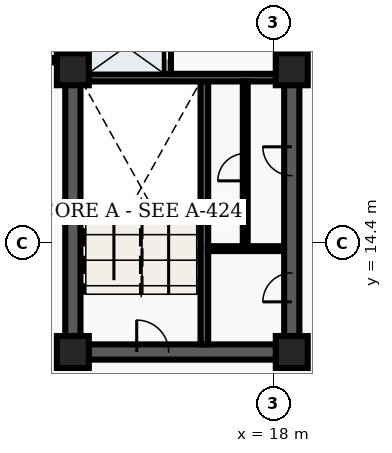
"""IFC4 building model, lengths in metres.
Left out: names, types, materials, properties, quantities, classifications, styles, units other than length and angle.
Written with IfcOpenShell. Run it as: python <this file> out.ifc"""

import sys

from ifc_helpers import new_model, entity, si_unit, converted_unit, direction, frame, origin_with_axes, origin_2d_with_axis, place, context, subcontext, project, spatial, polyline, rectangle, outline, extrude, element, fill, save


model = new_model("IFC4")
c1 = context("Model", 3, precision=1e-05, world=origin_with_axes(), true_north=direction((0.0, 1.0)))
c2 = subcontext(c1, "Body", "Model", "MODEL_VIEW")
j1 = project(units=[si_unit("LENGTHUNIT", "METRE"), converted_unit("PLANEANGLEUNIT", "DEGREE", entity("IfcPlaneAngleMeasure", 0.017), si_unit("PLANEANGLEUNIT", "RADIAN"), dimensions=[0, 0, 0, 0, 0, 0, 0])], contexts=[c1])
p1 = place(None, origin_with_axes())
s1 = spatial("IfcSite", under=j1, at=p1, CompositionType="ELEMENT")
p2 = place(p1, origin_with_axes())
s2 = spatial("IfcBuilding", under=s1, at=p2, CompositionType="ELEMENT")
p3 = place(p2, frame((0.0, 0.0, 183.6), z_axis=(0.0, 0.0, 1.0), x_axis=(1.0, 0.0, 0.0)))
s3 = spatial("IfcBuildingStorey", under=s2, at=p3, CompositionType="ELEMENT", Elevation=183.6)
p4 = place(p3, frame((11.4, 10.8, 0.0), z_axis=(0.0, 0.0, 1.0), x_axis=(0.0, 1.0, 0.0)))
e1 = element("IfcWall", 1, at=p4, inside=s3, PredefinedType="SHEAR", context=c2, shape_type="SweptSolid", body=[
    extrude(outline(polyline([(0.0, -0.25), (27.0, -0.25), (27.0, 0.25), (0.0, 0.25), (0.0, -0.25)])), origin_with_axes(), (0.0, 0.0, 1.0), 3.6),
])
p5 = place(p3, frame((11.4, 10.8, 0.0), z_axis=(0.0, 0.0, 1.0), x_axis=(1.0, 0.0, 0.0)))
e2 = element("IfcWall", 2, at=p5, inside=s3, PredefinedType="SHEAR", context=c2, shape_type="SweptSolid", body=[
    extrude(outline(polyline([(0.0, -0.25), (7.2, -0.25), (7.2, 0.25), (0.0, 0.25), (0.0, -0.25)])), origin_with_axes(), (0.0, 0.0, 1.0), 3.6),
])
p6 = place(p5, frame((2.625, 0.0, 0.0), z_axis=(0.0, 0.0, 1.0), x_axis=(1.0, 0.0, 0.0)))
e3 = element("IfcOpeningElement", 3, at=p6, cuts=e2, PredefinedType="OPENING", context=c2, shape_type="SweptSolid", body=[
    extrude(rectangle(XDim=1.05, YDim=0.52, at=origin_2d_with_axis()), origin_with_axes(), (0.0, 0.0, 1.0), 2.15),
])
p7 = place(p3, frame((18.6, 10.8, 0.0), z_axis=(0.0, 0.0, 1.0), x_axis=(0.0, 1.0, 0.0)))
e4 = element("IfcWall", 4, at=p7, inside=s3, PredefinedType="SHEAR", context=c2, shape_type="SweptSolid", body=[
    extrude(outline(polyline([(0.0, -0.25), (13.5, -0.25), (13.5, 0.25), (0.0, 0.25), (0.0, -0.25)])), origin_with_axes(), (0.0, 0.0, 1.0), 3.6),
])
p8 = place(p7, frame((11.125, 0.0, 0.0), z_axis=(0.0, 0.0, 1.0), x_axis=(1.0, 0.0, 0.0)))
e5 = element("IfcOpeningElement", 5, at=p8, cuts=e4, PredefinedType="OPENING", context=c2, shape_type="SweptSolid", body=[
    extrude(rectangle(XDim=1.05, YDim=0.52, at=origin_2d_with_axis()), origin_with_axes(), (0.0, 0.0, 1.0), 2.15),
])
p9 = place(p7, frame((2.125, 0.0, 0.0), z_axis=(0.0, 0.0, 1.0), x_axis=(1.0, 0.0, 0.0)))
e6 = element("IfcOpeningElement", 6, at=p9, cuts=e4, PredefinedType="OPENING", context=c2, shape_type="SweptSolid", body=[
    extrude(rectangle(XDim=0.95, YDim=0.52, at=origin_2d_with_axis()), origin_with_axes(), (0.0, 0.0, 1.0), 2.15),
])
p10 = place(p7, frame((6.275, 0.0, 0.0), z_axis=(0.0, 0.0, 1.0), x_axis=(1.0, 0.0, 0.0)))
e7 = element("IfcOpeningElement", 7, at=p10, cuts=e4, PredefinedType="OPENING", context=c2, shape_type="SweptSolid", body=[
    extrude(rectangle(XDim=0.95, YDim=0.52, at=origin_2d_with_axis()), origin_with_axes(), (0.0, 0.0, 1.0), 2.15),
])
p11 = place(p3, frame((15.725, 11.05, 0.0), z_axis=(0.0, 0.0, 1.0), x_axis=(0.0, 1.0, 0.0)))
e8 = element("IfcWall", 8, at=p11, inside=s3, PredefinedType="SHEAR", context=c2, shape_type="SweptSolid", body=[
    extrude(outline(polyline([(0.0, -0.125), (8.65, -0.125), (8.65, 0.125), (0.0, 0.125), (0.0, -0.125)])), origin_with_axes(), (0.0, 0.0, 1.0), 3.6),
])
p12 = place(p3, frame((11.65, 19.825, 0.0), z_axis=(0.0, 0.0, 1.0), x_axis=(1.0, 0.0, 0.0)))
e9 = element("IfcWall", 9, at=p12, inside=s3, PredefinedType="SHEAR", context=c2, shape_type="SweptSolid", body=[
    extrude(outline(polyline([(0.0, -0.125), (6.7, -0.125), (6.7, 0.125), (0.0, 0.125), (0.0, -0.125)])), origin_with_axes(), (0.0, 0.0, 1.0), 3.6),
])
p13 = place(p3, frame((14.5, 19.95, 0.0), z_axis=(0.0, 0.0, 1.0), x_axis=(0.0, 1.0, 0.0)))
e10 = element("IfcWall", 10, at=p13, inside=s3, PredefinedType="SOLIDWALL", context=c2, shape_type="SweptSolid", body=[
    extrude(outline(polyline([(0.0, -0.125), (6.25, -0.125), (6.25, 0.125), (0.0, 0.125), (0.0, -0.125)])), origin_with_axes(), (0.0, 0.0, 1.0), 2.64),
])
p14 = place(p13, frame((1.025, 0.0, 0.0), z_axis=(0.0, 0.0, 1.0), x_axis=(1.0, 0.0, 0.0)))
e11 = element("IfcOpeningElement", 11, at=p14, cuts=e10, PredefinedType="OPENING", context=c2, shape_type="SweptSolid", body=[
    extrude(rectangle(XDim=1.1, YDim=0.27, at=origin_2d_with_axis()), origin_with_axes(), (0.0, 0.0, 1.0), 2.15),
])
p15 = place(p13, frame((2.975, 0.0, 0.0), z_axis=(0.0, 0.0, 1.0), x_axis=(1.0, 0.0, 0.0)))
e12 = element("IfcOpeningElement", 12, at=p15, cuts=e10, PredefinedType="OPENING", context=c2, shape_type="SweptSolid", body=[
    extrude(rectangle(XDim=1.1, YDim=0.27, at=origin_2d_with_axis()), origin_with_axes(), (0.0, 0.0, 1.0), 2.15),
])
p16 = place(p13, frame((5.425, 0.0, 0.0), z_axis=(0.0, 0.0, 1.0), x_axis=(1.0, 0.0, 0.0)))
e13 = element("IfcOpeningElement", 13, at=p16, cuts=e10, PredefinedType="OPENING", context=c2, shape_type="SweptSolid", body=[
    extrude(rectangle(XDim=1.2, YDim=0.27, at=origin_2d_with_axis()), origin_with_axes(), (0.0, 0.0, 1.0), 2.15),
])
for number, where, z_axis, x_axis in (
    (14, (11.4, 10.8, 0.0), (0.0, 0.0, 1.0), (1.0, 0.0, 0.0)),
    (15, (11.4, 20.1, 0.0), (0.0, 0.0, 1.0), (1.0, 0.0, 0.0)),
    (16, (18.6, 10.8, 0.0), (0.0, 0.0, 1.0), (1.0, 0.0, 0.0)),
    (17, (18.6, 20.1, 0.0), (0.0, 0.0, 1.0), (1.0, 0.0, 0.0)),
):
    element("IfcColumn", number, at=place(p3, frame(where, z_axis=z_axis, x_axis=x_axis)), inside=s3, PredefinedType="COLUMN", context=c2, shape_type="SweptSolid", body=[
        extrude(rectangle(XDim=1.05, YDim=1.05, at=origin_2d_with_axis()), origin_with_axes(), (0.0, 0.0, 1.0), 3.9),
    ])
p17 = place(p3, frame((15.84, 14.2, 0.0), z_axis=(0.0, 0.0, 1.0), x_axis=(1.0, 0.0, 0.0)))
e18 = element("IfcWall", 18, at=p17, inside=s3, PredefinedType="PARTITIONING", context=c2, shape_type="SweptSolid", body=[
    extrude(outline(polyline([(0.0, -0.08), (2.46, -0.08), (2.46, 0.08), (0.0, 0.08), (0.0, -0.08)])), origin_with_axes(), (0.0, 0.0, 1.0), 2.64),
])
p18 = place(p3, frame((17.07, 14.28, 0.0), z_axis=(0.0, 0.0, 1.0), x_axis=(0.0, 1.0, 0.0)))
e19 = element("IfcWall", 19, at=p18, inside=s3, PredefinedType="PARTITIONING", context=c2, shape_type="SweptSolid", body=[
    extrude(outline(polyline([(0.0, -0.08), (5.42, -0.08), (5.42, 0.08), (0.0, 0.08), (0.0, -0.08)])), origin_with_axes(), (0.0, 0.0, 1.0), 2.64),
])
p19 = place(p18, frame((2.6, 0.0, 0.0), z_axis=(0.0, 0.0, 1.0), x_axis=(1.0, 0.0, 0.0)))
e20 = element("IfcOpeningElement", 20, at=p19, cuts=e19, PredefinedType="OPENING", context=c2, shape_type="SweptSolid", body=[
    extrude(rectangle(XDim=0.9, YDim=0.18, at=origin_2d_with_axis()), origin_with_axes(), (0.0, 0.0, 1.0), 2.15),
])
p20 = place(p3, frame((9.52, 20.4, 0.0), z_axis=(0.0, 0.0, 1.0), x_axis=(1.0, 0.0, 0.0)))
e21 = element("IfcWall", 21, at=p20, inside=s3, PredefinedType="PARTITIONING", context=c2, shape_type="SweptSolid", body=[
    extrude(outline(polyline([(0.0, -0.07), (1.58, -0.07), (1.58, 0.07), (0.0, 0.07), (0.0, -0.07)])), origin_with_axes(), (0.0, 0.0, 1.0), 2.64),
])
p21 = place(p13, frame((1.025, 0.0, 0.0), z_axis=(0.0, 0.0, 1.0), x_axis=(1.0, 0.0, 0.0)))
e22 = element("IfcDoor", 22, at=p21, inside=s3, OperationType="SLIDING_TO_LEFT", PredefinedType="DOOR", context=c2, shape_type="SweptSolid", body=[
    extrude(rectangle(XDim=1.1, YDim=0.09, at=origin_2d_with_axis()), origin_with_axes(), (0.0, 0.0, 1.0), 2.15),
])
fill(e11, e22)
p22 = place(p5, frame((2.625, 0.0, 0.0), z_axis=(0.0, 0.0, 1.0), x_axis=(1.0, 0.0, 0.0)))
e23 = element("IfcDoor", 23, at=p22, inside=s3, OperationType="SINGLE_SWING_LEFT", PredefinedType="DOOR", context=c2, shape_type="SweptSolid", body=[
    extrude(rectangle(XDim=1.05, YDim=0.09, at=origin_2d_with_axis()), origin_with_axes(), (0.0, 0.0, 1.0), 2.15),
])
fill(e3, e23)
p23 = place(p7, frame((2.125, 0.0, 0.0), z_axis=(0.0, 0.0, 1.0), x_axis=(1.0, 0.0, 0.0)))
e24 = element("IfcDoor", 24, at=p23, inside=s3, OperationType="SINGLE_SWING_LEFT", PredefinedType="DOOR", context=c2, shape_type="SweptSolid", body=[
    extrude(rectangle(XDim=0.95, YDim=0.09, at=origin_2d_with_axis()), origin_with_axes(), (0.0, 0.0, 1.0), 2.15),
])
fill(e6, e24)
p24 = place(p18, frame((2.6, 0.0, 0.0), z_axis=(0.0, 0.0, 1.0), x_axis=(1.0, 0.0, 0.0)))
e25 = element("IfcDoor", 25, at=p24, inside=s3, OperationType="SINGLE_SWING_LEFT", PredefinedType="DOOR", context=c2, shape_type="SweptSolid", body=[
    extrude(rectangle(XDim=0.9, YDim=0.09, at=origin_2d_with_axis()), origin_with_axes(), (0.0, 0.0, 1.0), 2.15),
])
fill(e20, e25)
p25 = place(p7, frame((6.275, 0.0, 0.0), z_axis=(0.0, 0.0, 1.0), x_axis=(1.0, 0.0, 0.0)))
e26 = element("IfcDoor", 26, at=p25, inside=s3, OperationType="SINGLE_SWING_RIGHT", PredefinedType="DOOR", context=c2, shape_type="SweptSolid", body=[
    extrude(rectangle(XDim=0.95, YDim=0.09, at=origin_2d_with_axis()), origin_with_axes(), (0.0, 0.0, 1.0), 2.15),
])
fill(e7, e26)
save(model, sys.argv[1])
